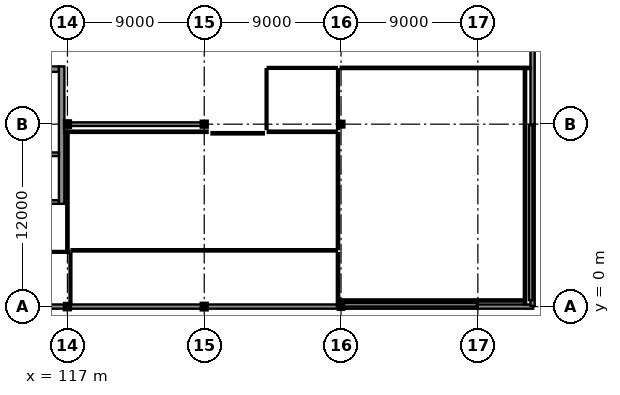
"""IFC4 building model, lengths in metres.
Left out: names, types, materials, properties, quantities, classifications, styles, units other than length and angle.
Written with IfcOpenShell. Run it as: python <this file> out.ifc"""

import sys

from ifc_helpers import new_model, si_unit, direction, frame, frame_2d, origin, origin_2d, place, context, subcontext, project, spatial, rectangle, i_section, extrude, element, fill, save


model = new_model("IFC4")
c1 = context("Model", 3, precision=1e-05, world=origin(), true_north=direction((0.0, 1.0)))
c2 = subcontext(c1, "Body", "Model", "MODEL_VIEW")
j1 = project(units=[si_unit("LENGTHUNIT", "METRE"), si_unit("PLANEANGLEUNIT", "RADIAN")], contexts=[c1])
p1 = place(None, origin())
s1 = spatial("IfcSite", under=j1, at=p1, CompositionType="ELEMENT")
p2 = place(p1, origin())
s2 = spatial("IfcBuilding", under=s1, at=p2, CompositionType="ELEMENT")
p3 = place(p2, frame((0.0, 0.0, 23.4)))
s3 = spatial("IfcBuildingStorey", under=s2, at=p3, CompositionType="ELEMENT", Elevation=23.4)
p4 = place(p3, frame((117.0, 0.0, 0.0), z_axis=(0.0, 0.0, 1.0), x_axis=(1.0, 0.0, 0.0)))
e1 = element("IfcColumn", 1, at=p4, inside=s3, PredefinedType="COLUMN", context=c2, shape_type="SweptSolid", body=[
    extrude(i_section(OverallWidth=0.3, OverallDepth=0.32, WebThickness=0.011, FlangeThickness=0.021, at=origin_2d()), origin(), (0.0, 0.0, 1.0), 4.0),
])
for number, where, z_axis, x_axis in (
    (2, (117.0, 12.0, 0.0), (0.0, 0.0, 1.0), (0.0, 1.0, 0.0)),
    (3, (126.0, 0.0, 0.0), (0.0, 0.0, 1.0), (1.0, 0.0, 0.0)),
):
    element("IfcColumn", number, at=place(p3, frame(where, z_axis=z_axis, x_axis=x_axis)), inside=s3, PredefinedType="COLUMN", context=c2, shape_type="SweptSolid", body=[
        extrude(i_section(OverallWidth=0.3, OverallDepth=0.34, WebThickness=0.012, FlangeThickness=0.021, at=origin_2d()), origin(), (0.0, 0.0, 1.0), 4.0),
    ])
p5 = place(p3, frame((126.0, 12.0, 0.0), z_axis=(0.0, 0.0, 1.0), x_axis=(1.0, 0.0, 0.0)))
e4 = element("IfcColumn", 4, at=p5, inside=s3, PredefinedType="COLUMN", context=c2, shape_type="SweptSolid", body=[
    extrude(i_section(OverallWidth=0.3, OverallDepth=0.3, WebThickness=0.011, FlangeThickness=0.019, at=origin_2d()), origin(), (0.0, 0.0, 1.0), 4.0),
])
p6 = place(p3, frame((135.0, 0.0, 0.0), z_axis=(0.0, 0.0, 1.0), x_axis=(0.0, 1.0, 0.0)))
e5 = element("IfcColumn", 5, at=p6, inside=s3, PredefinedType="COLUMN", context=c2, shape_type="SweptSolid", body=[
    extrude(i_section(OverallWidth=0.26, OverallDepth=0.26, WebThickness=0.01, FlangeThickness=0.018, at=origin_2d()), origin(), (0.0, 0.0, 1.0), 4.0),
])
p7 = place(p3, frame((135.0, 12.0, 0.0), z_axis=(0.0, 0.0, 1.0), x_axis=(1.0, 0.0, 0.0)))
e6 = element("IfcColumn", 6, at=p7, inside=s3, PredefinedType="COLUMN", context=c2, shape_type="SweptSolid", body=[
    extrude(i_section(OverallWidth=0.28, OverallDepth=0.28, WebThickness=0.01, FlangeThickness=0.018, at=origin_2d()), origin(), (0.0, 0.0, 1.0), 4.0),
])
p8 = place(p3, frame((108.008, 0.0, 0.0), z_axis=(0.0, 0.0, 1.0), x_axis=(1.0, 0.0, 0.0)))
e7 = element("IfcWall", 7, at=p8, inside=s3, PredefinedType="SOLIDWALL", context=c2, shape_type="SweptSolid", body=[
    extrude(rectangle(XDim=8.984, YDim=0.28, at=frame_2d((4.492, 0.0))), origin(), (0.0, 0.0, 1.0), 2.747),
])
p9 = place(p8, frame((2.045, 0.0, 0.9)))
e8 = element("IfcOpeningElement", 8, at=p9, cuts=e7, PredefinedType="OPENING", context=c2, shape_type="SweptSolid", body=[
    extrude(rectangle(XDim=1.3, YDim=1.3, at=frame_2d((0.65, 0.65))), frame((0.0, 0.155, 0.0), z_axis=(0.0, -1.0, 0.0), x_axis=(1.0, 0.0, 0.0)), (0.0, 0.0, 1.0), 0.31),
])
p10 = place(p8, frame((5.639, 0.0, 0.9)))
e9 = element("IfcOpeningElement", 9, at=p10, cuts=e7, PredefinedType="OPENING", context=c2, shape_type="SweptSolid", body=[
    extrude(rectangle(XDim=1.3, YDim=1.3, at=frame_2d((0.65, 0.65))), frame((0.0, 0.155, 0.0), z_axis=(0.0, -1.0, 0.0), x_axis=(1.0, 0.0, 0.0)), (0.0, 0.0, 1.0), 0.31),
])
p11 = place(p3, frame((117.008, 0.0, 0.0), z_axis=(0.0, 0.0, 1.0), x_axis=(1.0, 0.0, 0.0)))
e10 = element("IfcWall", 10, at=p11, inside=s3, PredefinedType="SOLIDWALL", context=c2, shape_type="SweptSolid", body=[
    extrude(rectangle(XDim=8.984, YDim=0.28, at=frame_2d((4.492, 0.0))), origin(), (0.0, 0.0, 1.0), 2.747),
])
p12 = place(p11, frame((2.045, 0.0, 0.9)))
e11 = element("IfcOpeningElement", 11, at=p12, cuts=e10, PredefinedType="OPENING", context=c2, shape_type="SweptSolid", body=[
    extrude(rectangle(XDim=1.3, YDim=1.3, at=frame_2d((0.65, 0.65))), frame((0.0, 0.155, 0.0), z_axis=(0.0, -1.0, 0.0), x_axis=(1.0, 0.0, 0.0)), (0.0, 0.0, 1.0), 0.31),
])
p13 = place(p11, frame((5.639, 0.0, 0.9)))
e12 = element("IfcOpeningElement", 12, at=p13, cuts=e10, PredefinedType="OPENING", context=c2, shape_type="SweptSolid", body=[
    extrude(rectangle(XDim=1.3, YDim=1.3, at=frame_2d((0.65, 0.65))), frame((0.0, 0.155, 0.0), z_axis=(0.0, -1.0, 0.0), x_axis=(1.0, 0.0, 0.0)), (0.0, 0.0, 1.0), 0.31),
])
p14 = place(p3, frame((126.008, 0.0, 0.0), z_axis=(0.0, 0.0, 1.0), x_axis=(1.0, 0.0, 0.0)))
e13 = element("IfcWall", 13, at=p14, inside=s3, PredefinedType="SOLIDWALL", context=c2, shape_type="SweptSolid", body=[
    extrude(rectangle(XDim=8.864, YDim=0.28, at=frame_2d((4.432, 0.0))), origin(), (0.0, 0.0, 1.0), 2.747),
])
p15 = place(p14, frame((2.009, 0.0, 0.9)))
e14 = element("IfcOpeningElement", 14, at=p15, cuts=e13, PredefinedType="OPENING", context=c2, shape_type="SweptSolid", body=[
    extrude(rectangle(XDim=1.3, YDim=1.3, at=frame_2d((0.65, 0.65))), frame((0.0, 0.155, 0.0), z_axis=(0.0, -1.0, 0.0), x_axis=(1.0, 0.0, 0.0)), (0.0, 0.0, 1.0), 0.31),
])
p16 = place(p14, frame((5.555, 0.0, 0.9)))
e15 = element("IfcOpeningElement", 15, at=p16, cuts=e13, PredefinedType="OPENING", context=c2, shape_type="SweptSolid", body=[
    extrude(rectangle(XDim=1.3, YDim=1.3, at=frame_2d((0.65, 0.65))), frame((0.0, 0.155, 0.0), z_axis=(0.0, -1.0, 0.0), x_axis=(1.0, 0.0, 0.0)), (0.0, 0.0, 1.0), 0.31),
])
p17 = place(p3, frame((135.128, 0.0, 0.0), z_axis=(0.0, 0.0, 1.0), x_axis=(1.0, 0.0, 0.0)))
e16 = element("IfcWall", 16, at=p17, inside=s3, PredefinedType="SOLIDWALL", context=c2, shape_type="SweptSolid", body=[
    extrude(rectangle(XDim=8.882, YDim=0.28, at=frame_2d((4.441, 0.0))), origin(), (0.0, 0.0, 1.0), 2.747),
])
p18 = place(p3, frame((143.99, 0.0, 0.0), z_axis=(0.0, 0.0, 1.0), x_axis=(1.0, 0.0, 0.0)))
e17 = element("IfcWall", 17, at=p18, inside=s3, PredefinedType="SOLIDWALL", context=c2, shape_type="SweptSolid", body=[
    extrude(rectangle(XDim=3.65, YDim=0.28, at=frame_2d((1.825, 0.0))), origin(), (0.0, 0.0, 1.0), 2.747),
])
p19 = place(p3, frame((147.6, 0.04, 0.0), z_axis=(0.0, 0.0, 1.0), x_axis=(0.0, 1.0, 0.0)))
e18 = element("IfcWall", 18, at=p19, inside=s3, PredefinedType="SOLIDWALL", context=c2, shape_type="SweptSolid", body=[
    extrude(rectangle(XDim=11.97, YDim=0.28, at=frame_2d((5.985, 0.0))), origin(), (0.0, 0.0, 1.0), 3.055),
])
p20 = place(p19, frame((2.941, 0.0, 0.9)))
e19 = element("IfcOpeningElement", 19, at=p20, cuts=e18, PredefinedType="OPENING", context=c2, shape_type="SweptSolid", body=[
    extrude(rectangle(XDim=1.3, YDim=1.3, at=frame_2d((0.65, 0.65))), frame((0.0, 0.155, 0.0), z_axis=(0.0, -1.0, 0.0), x_axis=(1.0, 0.0, 0.0)), (0.0, 0.0, 1.0), 0.31),
])
p21 = place(p19, frame((7.729, 0.0, 0.9)))
e20 = element("IfcOpeningElement", 20, at=p21, cuts=e18, PredefinedType="OPENING", context=c2, shape_type="SweptSolid", body=[
    extrude(rectangle(XDim=1.3, YDim=1.3, at=frame_2d((0.65, 0.65))), frame((0.0, 0.155, 0.0), z_axis=(0.0, -1.0, 0.0), x_axis=(1.0, 0.0, 0.0)), (0.0, 0.0, 1.0), 0.31),
])
p22 = place(p3, frame((147.6, 11.99, 0.0), z_axis=(0.0, 0.0, 1.0), x_axis=(0.0, 1.0, 0.0)))
e21 = element("IfcWall", 21, at=p22, inside=s3, PredefinedType="SOLIDWALL", context=c2, shape_type="SweptSolid", body=[
    extrude(rectangle(XDim=12.05, YDim=0.28, at=frame_2d((6.025, 0.0))), origin(), (0.0, 0.0, 1.0), 3.055),
])
p23 = place(p22, frame((2.17, 0.0, 0.9)))
e22 = element("IfcOpeningElement", 22, at=p23, cuts=e21, PredefinedType="OPENING", context=c2, shape_type="SweptSolid", body=[
    extrude(rectangle(XDim=1.3, YDim=1.3, at=frame_2d((0.65, 0.65))), frame((0.0, 0.155, 0.0), z_axis=(0.0, -1.0, 0.0), x_axis=(1.0, 0.0, 0.0)), (0.0, 0.0, 1.0), 0.31),
])
p24 = place(p22, frame((7.785, 0.0, 0.9)))
e23 = element("IfcOpeningElement", 23, at=p24, cuts=e21, PredefinedType="OPENING", context=c2, shape_type="SweptSolid", body=[
    extrude(rectangle(XDim=1.3, YDim=1.3, at=frame_2d((0.65, 0.65))), frame((0.0, 0.155, 0.0), z_axis=(0.0, -1.0, 0.0), x_axis=(1.0, 0.0, 0.0)), (0.0, 0.0, 1.0), 0.31),
])
p25 = place(p3, frame((135.06, 0.12, 3.78), z_axis=(0.0, 0.0, 1.0), x_axis=(1.0, 0.0, 0.0)))
e24 = element("IfcWall", 24, at=p25, inside=s3, PredefinedType="PARAPET", context=c2, shape_type="SweptSolid", body=[
    extrude(rectangle(XDim=8.88, YDim=0.24, at=frame_2d((4.44, 0.0))), origin(), (0.0, 0.0, 1.0), 0.77),
])
p26 = place(p3, frame((147.48, 0.42, 3.78), z_axis=(0.0, 0.0, 1.0), x_axis=(0.0, 1.0, 0.0)))
e25 = element("IfcWall", 25, at=p26, inside=s3, PredefinedType="PARAPET", context=c2, shape_type="SweptSolid", body=[
    extrude(rectangle(XDim=11.52, YDim=0.24, at=frame_2d((5.76, 0.0))), origin(), (0.0, 0.0, 1.0), 0.77),
])
p27 = place(p3, frame((112.54, 15.62, 0.0), z_axis=(0.0, 0.0, 1.0), x_axis=(1.0, 0.0, 0.0)))
e26 = element("IfcWall", 26, at=p27, inside=s3, PredefinedType="SHEAR", context=c2, shape_type="SweptSolid", body=[
    extrude(rectangle(XDim=3.9, YDim=0.36, at=frame_2d((1.95, 0.0))), origin(), (0.0, 0.0, 1.0), 3.66),
])
p28 = place(p27, frame((1.15, 0.0, 0.0)))
e27 = element("IfcOpeningElement", 27, at=p28, cuts=e26, PredefinedType="OPENING", context=c2, shape_type="SweptSolid", body=[
    extrude(rectangle(XDim=1.6, YDim=2.25, at=frame_2d((0.8, 1.125))), frame((0.0, 0.195, 0.0), z_axis=(0.0, -1.0, 0.0), x_axis=(1.0, 0.0, 0.0)), (0.0, 0.0, 1.0), 0.39),
])
p29 = place(p3, frame((116.62, 6.76, 0.0), z_axis=(0.0, 0.0, 1.0), x_axis=(0.0, 1.0, 0.0)))
e28 = element("IfcWall", 28, at=p29, inside=s3, PredefinedType="SHEAR", context=c2, shape_type="SweptSolid", body=[
    extrude(rectangle(XDim=9.04, YDim=0.36, at=frame_2d((4.52, 0.0))), origin(), (0.0, 0.0, 1.0), 3.66),
])
p30 = place(p3, frame((112.54, 10.02, 0.0), z_axis=(0.0, 0.0, 1.0), x_axis=(1.0, 0.0, 0.0)))
e29 = element("IfcWall", 29, at=p30, inside=s3, PredefinedType="SHEAR", context=c2, shape_type="SweptSolid", body=[
    extrude(rectangle(XDim=3.9, YDim=0.24, at=frame_2d((1.95, 0.0))), origin(), (0.0, 0.0, 1.0), 3.81),
])
p31 = place(p30, frame((0.235, 0.0, 0.0)))
e30 = element("IfcOpeningElement", 30, at=p31, cuts=e29, PredefinedType="OPENING", context=c2, shape_type="SweptSolid", body=[
    extrude(rectangle(XDim=1.6, YDim=2.3, at=frame_2d((0.8, 1.15))), frame((0.0, 0.135, 0.0), z_axis=(0.0, -1.0, 0.0), x_axis=(1.0, 0.0, 0.0)), (0.0, 0.0, 1.0), 0.27),
])
p32 = place(p30, frame((2.185, 0.0, 0.0)))
e31 = element("IfcOpeningElement", 31, at=p32, cuts=e29, PredefinedType="OPENING", context=c2, shape_type="SweptSolid", body=[
    extrude(rectangle(XDim=1.6, YDim=2.3, at=frame_2d((0.8, 1.15))), frame((0.0, 0.135, 0.0), z_axis=(0.0, -1.0, 0.0), x_axis=(1.0, 0.0, 0.0)), (0.0, 0.0, 1.0), 0.27),
])
p33 = place(p3, frame((112.54, 6.88, 0.0), z_axis=(0.0, 0.0, 1.0), x_axis=(1.0, 0.0, 0.0)))
e32 = element("IfcWall", 32, at=p33, inside=s3, PredefinedType="SHEAR", context=c2, shape_type="SweptSolid", body=[
    extrude(rectangle(XDim=3.9, YDim=0.24, at=frame_2d((1.95, 0.0))), origin(), (0.0, 0.0, 1.0), 3.81),
])
p34 = place(p3, frame((117.168, 12.0, 0.0), z_axis=(0.0, 0.0, 1.0), x_axis=(1.0, 0.0, 0.0)))
e33 = element("IfcWall", 33, at=p34, inside=s3, PredefinedType="SHEAR", context=c2, shape_type="SweptSolid", body=[
    extrude(rectangle(XDim=8.824, YDim=0.24, at=frame_2d((4.412, 0.0))), origin(), (0.0, 0.0, 1.0), 2.845),
])
p35 = place(p3, frame((53.87, 3.6, 0.0), z_axis=(0.0, 0.0, 1.0), x_axis=(1.0, 0.0, 0.0)))
e34 = element("IfcWall", 34, at=p35, inside=s3, PredefinedType="PARTITIONING", context=c2, shape_type="SweptSolid", body=[
    extrude(rectangle(XDim=63.25, YDim=0.12, at=frame_2d((31.625, 0.0))), origin(), (0.0, 0.0, 1.0), 3.64),
])
p36 = place(p35, frame((19.855, 0.0, 0.0)))
e35 = element("IfcOpeningElement", 35, at=p36, cuts=e34, PredefinedType="OPENING", context=c2, shape_type="SweptSolid", body=[
    extrude(rectangle(XDim=0.95, YDim=2.15, at=frame_2d((0.475, 1.075))), frame((0.0, 0.075, 0.0), z_axis=(0.0, -1.0, 0.0), x_axis=(1.0, 0.0, 0.0)), (0.0, 0.0, 1.0), 0.15),
])
p37 = place(p3, frame((117.2, 3.52, 0.0), z_axis=(0.0, 0.0, 1.0), x_axis=(0.0, -1.0, 0.0)))
e36 = element("IfcWall", 36, at=p37, inside=s3, PredefinedType="PARTITIONING", context=c2, shape_type="SweptSolid", body=[
    extrude(rectangle(XDim=3.362, YDim=0.12, at=frame_2d((1.681, 0.0))), origin(), (0.0, 0.0, 1.0), 3.365),
])
p38 = place(p3, frame((126.48, 11.4, 0.0), z_axis=(0.0, 0.0, 1.0), x_axis=(1.0, 0.0, 0.0)))
e37 = element("IfcWall", 37, at=p38, inside=s3, PredefinedType="PARTITIONING", context=c2, shape_type="SweptSolid", body=[
    extrude(rectangle(XDim=3.44, YDim=0.15, at=frame_2d((1.72, 0.0))), origin(), (0.0, 0.0, 1.0), 3.64),
])
p39 = place(p38, frame((1.195, 0.0, 0.0)))
e38 = element("IfcOpeningElement", 38, at=p39, cuts=e37, PredefinedType="OPENING", context=c2, shape_type="SweptSolid", body=[
    extrude(rectangle(XDim=1.05, YDim=2.25, at=frame_2d((0.525, 1.125))), frame((0.0, 0.09, 0.0), z_axis=(0.0, -1.0, 0.0), x_axis=(1.0, 0.0, 0.0)), (0.0, 0.0, 1.0), 0.18),
])
p40 = place(p3, frame((130.18, 11.5, 0.0), z_axis=(0.0, 0.0, 1.0), x_axis=(1.0, 0.0, 0.0)))
e39 = element("IfcWall", 39, at=p40, inside=s3, PredefinedType="PARTITIONING", context=c2, shape_type="SweptSolid", body=[
    extrude(rectangle(XDim=4.54, YDim=0.15, at=frame_2d((2.27, 0.0))), origin(), (0.0, 0.0, 1.0), 3.64),
])
p41 = place(p3, frame((134.8, 11.42, 0.0), z_axis=(0.0, 0.0, 1.0), x_axis=(0.0, -1.0, 0.0)))
e40 = element("IfcWall", 40, at=p41, inside=s3, PredefinedType="PARTITIONING", context=c2, shape_type="SweptSolid", body=[
    extrude(rectangle(XDim=7.64, YDim=0.15, at=frame_2d((3.82, 0.0))), origin(), (0.0, 0.0, 1.0), 3.285),
])
p42 = place(p3, frame((134.72, 3.7, 0.0), z_axis=(0.0, 0.0, 1.0), x_axis=(-1.0, 0.0, 0.0)))
e41 = element("IfcWall", 41, at=p42, inside=s3, PredefinedType="PARTITIONING", context=c2, shape_type="SweptSolid", body=[
    extrude(rectangle(XDim=17.44, YDim=0.15, at=frame_2d((8.72, 0.0))), origin(), (0.0, 0.0, 1.0), 3.64),
])
p43 = place(p3, frame((117.0, 3.655, 0.0), z_axis=(0.0, 0.0, 1.0), x_axis=(0.0, 1.0, 0.0)))
e42 = element("IfcWall", 42, at=p43, inside=s3, PredefinedType="PARTITIONING", context=c2, shape_type="SweptSolid", body=[
    extrude(rectangle(XDim=7.765, YDim=0.15, at=frame_2d((3.882, 0.0))), origin(), (0.0, 0.0, 1.0), 3.365),
])
p44 = place(p3, frame((116.795, 11.5, 0.0), z_axis=(0.0, 0.0, 1.0), x_axis=(1.0, 0.0, 0.0)))
e43 = element("IfcWall", 43, at=p44, inside=s3, PredefinedType="PARTITIONING", context=c2, shape_type="SweptSolid", body=[
    extrude(rectangle(XDim=9.425, YDim=0.15, at=frame_2d((4.712, 0.0))), origin(), (0.0, 0.0, 1.0), 3.64),
])
p45 = place(p3, frame((134.8, 15.62, 0.0), z_axis=(0.0, 0.0, 1.0), x_axis=(0.0, -1.0, 0.0)))
e44 = element("IfcWall", 44, at=p45, inside=s3, PredefinedType="PARTITIONING", context=c2, shape_type="SweptSolid", body=[
    extrude(rectangle(XDim=3.94, YDim=0.12, at=frame_2d((1.97, 0.0))), origin(), (0.0, 0.0, 1.0), 3.285),
])
p46 = place(p3, frame((130.1, 11.68, 0.0), z_axis=(0.0, 0.0, 1.0), x_axis=(0.0, 1.0, 0.0)))
e45 = element("IfcWall", 45, at=p46, inside=s3, PredefinedType="PARTITIONING", context=c2, shape_type="SweptSolid", body=[
    extrude(rectangle(XDim=3.94, YDim=0.12, at=frame_2d((1.97, 0.0))), origin(), (0.0, 0.0, 1.0), 3.64),
])
p47 = place(p3, frame((130.18, 15.7, 0.0), z_axis=(0.0, 0.0, 1.0), x_axis=(1.0, 0.0, 0.0)))
e46 = element("IfcWall", 46, at=p47, inside=s3, PredefinedType="PARTITIONING", context=c2, shape_type="SweptSolid", body=[
    extrude(rectangle(XDim=4.54, YDim=0.12, at=frame_2d((2.27, 0.0))), origin(), (0.0, 0.0, 1.0), 3.64),
])
p48 = place(p47, frame((1.795, 0.0, 0.0)))
e47 = element("IfcOpeningElement", 47, at=p48, cuts=e46, PredefinedType="OPENING", context=c2, shape_type="SweptSolid", body=[
    extrude(rectangle(XDim=0.95, YDim=2.15, at=frame_2d((0.475, 1.075))), frame((0.0, 0.075, 0.0), z_axis=(0.0, -1.0, 0.0), x_axis=(1.0, 0.0, 0.0)), (0.0, 0.0, 1.0), 0.15),
])
p49 = place(p3, frame((134.98, 15.7, 0.0), z_axis=(0.0, 0.0, 1.0), x_axis=(1.0, 0.0, 0.0)))
e48 = element("IfcWall", 48, at=p49, inside=s3, PredefinedType="PARTITIONING", context=c2, shape_type="SweptSolid", body=[
    extrude(rectangle(XDim=12.485, YDim=0.15, at=frame_2d((6.243, 0.0))), origin(), (0.0, 0.0, 1.0), 3.64),
])
p50 = place(p49, frame((5.718, 0.0, 0.0)))
e49 = element("IfcOpeningElement", 49, at=p50, cuts=e48, PredefinedType="OPENING", context=c2, shape_type="SweptSolid", body=[
    extrude(rectangle(XDim=1.05, YDim=2.25, at=frame_2d((0.525, 1.125))), frame((0.0, 0.09, 0.0), z_axis=(0.0, -1.0, 0.0), x_axis=(1.0, 0.0, 0.0)), (0.0, 0.0, 1.0), 0.18),
])
p51 = place(p3, frame((147.1, 15.63, 0.0), z_axis=(0.0, 0.0, 1.0), x_axis=(0.0, -1.0, 0.0)))
e50 = element("IfcWall", 50, at=p51, inside=s3, PredefinedType="PARTITIONING", context=c2, shape_type="SweptSolid", body=[
    extrude(rectangle(XDim=15.495, YDim=0.15, at=frame_2d((7.748, 0.0))), origin(), (0.0, 0.0, 1.0), 3.64),
])
p52 = place(p3, frame((147.03, 0.4, 0.0), z_axis=(0.0, 0.0, 1.0), x_axis=(-1.0, 0.0, 0.0)))
e51 = element("IfcWall", 51, at=p52, inside=s3, PredefinedType="PARTITIONING", context=c2, shape_type="SweptSolid", body=[
    extrude(rectangle(XDim=12.15, YDim=0.15, at=frame_2d((6.075, 0.0))), origin(), (0.0, 0.0, 1.0), 3.64),
])
p53 = place(p3, frame((134.8, 0.008, 0.0), z_axis=(0.0, 0.0, 1.0), x_axis=(0.0, 1.0, 0.0)))
e52 = element("IfcWall", 52, at=p53, inside=s3, PredefinedType="PARTITIONING", context=c2, shape_type="SweptSolid", body=[
    extrude(rectangle(XDim=3.512, YDim=0.15, at=frame_2d((1.756, 0.0))), origin(), (0.0, 0.0, 1.0), 3.285),
])
p54 = place(p12, origin())
e53 = element("IfcWindow", 53, at=p54, inside=s3, PartitioningType="SINGLE_PANEL", PredefinedType="WINDOW", context=c2, shape_type="SweptSolid", body=[
    extrude(rectangle(XDim=1.3, YDim=1.3, at=frame_2d((0.65, 0.65))), frame((0.0, 0.03, 0.0), z_axis=(0.0, -1.0, 0.0), x_axis=(1.0, 0.0, 0.0)), (0.0, 0.0, 1.0), 0.06),
])
fill(e11, e53)
p55 = place(p13, origin())
e54 = element("IfcWindow", 54, at=p55, inside=s3, PartitioningType="SINGLE_PANEL", PredefinedType="WINDOW", context=c2, shape_type="SweptSolid", body=[
    extrude(rectangle(XDim=1.3, YDim=1.3, at=frame_2d((0.65, 0.65))), frame((0.0, 0.03, 0.0), z_axis=(0.0, -1.0, 0.0), x_axis=(1.0, 0.0, 0.0)), (0.0, 0.0, 1.0), 0.06),
])
fill(e12, e54)
p56 = place(p15, origin())
e55 = element("IfcWindow", 55, at=p56, inside=s3, PartitioningType="SINGLE_PANEL", PredefinedType="WINDOW", context=c2, shape_type="SweptSolid", body=[
    extrude(rectangle(XDim=1.3, YDim=1.3, at=frame_2d((0.65, 0.65))), frame((0.0, 0.03, 0.0), z_axis=(0.0, -1.0, 0.0), x_axis=(1.0, 0.0, 0.0)), (0.0, 0.0, 1.0), 0.06),
])
fill(e14, e55)
p57 = place(p16, origin())
e56 = element("IfcWindow", 56, at=p57, inside=s3, PartitioningType="SINGLE_PANEL", PredefinedType="WINDOW", context=c2, shape_type="SweptSolid", body=[
    extrude(rectangle(XDim=1.3, YDim=1.3, at=frame_2d((0.65, 0.65))), frame((0.0, 0.03, 0.0), z_axis=(0.0, -1.0, 0.0), x_axis=(1.0, 0.0, 0.0)), (0.0, 0.0, 1.0), 0.06),
])
fill(e15, e56)
p58 = place(p20, origin())
e57 = element("IfcWindow", 57, at=p58, inside=s3, PartitioningType="SINGLE_PANEL", PredefinedType="WINDOW", context=c2, shape_type="SweptSolid", body=[
    extrude(rectangle(XDim=1.3, YDim=1.3, at=frame_2d((0.65, 0.65))), frame((0.0, 0.03, 0.0), z_axis=(0.0, -1.0, 0.0), x_axis=(1.0, 0.0, 0.0)), (0.0, 0.0, 1.0), 0.06),
])
fill(e19, e57)
p59 = place(p21, origin())
e58 = element("IfcWindow", 58, at=p59, inside=s3, PartitioningType="SINGLE_PANEL", PredefinedType="WINDOW", context=c2, shape_type="SweptSolid", body=[
    extrude(rectangle(XDim=1.3, YDim=1.3, at=frame_2d((0.65, 0.65))), frame((0.0, 0.03, 0.0), z_axis=(0.0, -1.0, 0.0), x_axis=(1.0, 0.0, 0.0)), (0.0, 0.0, 1.0), 0.06),
])
fill(e20, e58)
p60 = place(p23, origin())
e59 = element("IfcWindow", 59, at=p60, inside=s3, PartitioningType="SINGLE_PANEL", PredefinedType="WINDOW", context=c2, shape_type="SweptSolid", body=[
    extrude(rectangle(XDim=1.3, YDim=1.3, at=frame_2d((0.65, 0.65))), frame((0.0, 0.03, 0.0), z_axis=(0.0, -1.0, 0.0), x_axis=(1.0, 0.0, 0.0)), (0.0, 0.0, 1.0), 0.06),
])
fill(e22, e59)
p61 = place(p32, origin())
e60 = element("IfcDoor", 60, at=p61, inside=s3, OperationType="DOUBLE_DOOR_SLIDING", PredefinedType="DOOR", context=c2, shape_type="SweptSolid", body=[
    extrude(rectangle(XDim=1.6, YDim=2.3, at=frame_2d((0.8, 1.15))), frame((0.0, 0.025, 0.0), z_axis=(0.0, -1.0, 0.0), x_axis=(1.0, 0.0, 0.0)), (0.0, 0.0, 1.0), 0.05),
])
fill(e31, e60)
p62 = place(p39, frame((1.05, 0.0, 0.0), z_axis=(0.0, 0.0, 1.0), x_axis=(-1.0, 0.0, 0.0)))
e61 = element("IfcDoor", 61, at=p62, inside=s3, OperationType="SINGLE_SWING_LEFT", PredefinedType="DOOR", context=c2, shape_type="SweptSolid", body=[
    extrude(rectangle(XDim=1.05, YDim=2.25, at=frame_2d((0.525, 1.125))), frame((0.0, 0.025, 0.0), z_axis=(0.0, -1.0, 0.0), x_axis=(1.0, 0.0, 0.0)), (0.0, 0.0, 1.0), 0.05),
])
fill(e38, e61)
p63 = place(p48, origin())
e62 = element("IfcDoor", 62, at=p63, inside=s3, OperationType="SINGLE_SWING_RIGHT", PredefinedType="DOOR", context=c2, shape_type="SweptSolid", body=[
    extrude(rectangle(XDim=0.95, YDim=2.15, at=frame_2d((0.475, 1.075))), frame((0.0, 0.025, 0.0), z_axis=(0.0, -1.0, 0.0), x_axis=(1.0, 0.0, 0.0)), (0.0, 0.0, 1.0), 0.05),
])
fill(e47, e62)
p64 = place(p50, frame((1.05, 0.0, 0.0), z_axis=(0.0, 0.0, 1.0), x_axis=(-1.0, 0.0, 0.0)))
e63 = element("IfcDoor", 63, at=p64, inside=s3, OperationType="SINGLE_SWING_LEFT", PredefinedType="DOOR", context=c2, shape_type="SweptSolid", body=[
    extrude(rectangle(XDim=1.05, YDim=2.25, at=frame_2d((0.525, 1.125))), frame((0.0, 0.025, 0.0), z_axis=(0.0, -1.0, 0.0), x_axis=(1.0, 0.0, 0.0)), (0.0, 0.0, 1.0), 0.05),
])
fill(e49, e63)
save(model, sys.argv[1])
